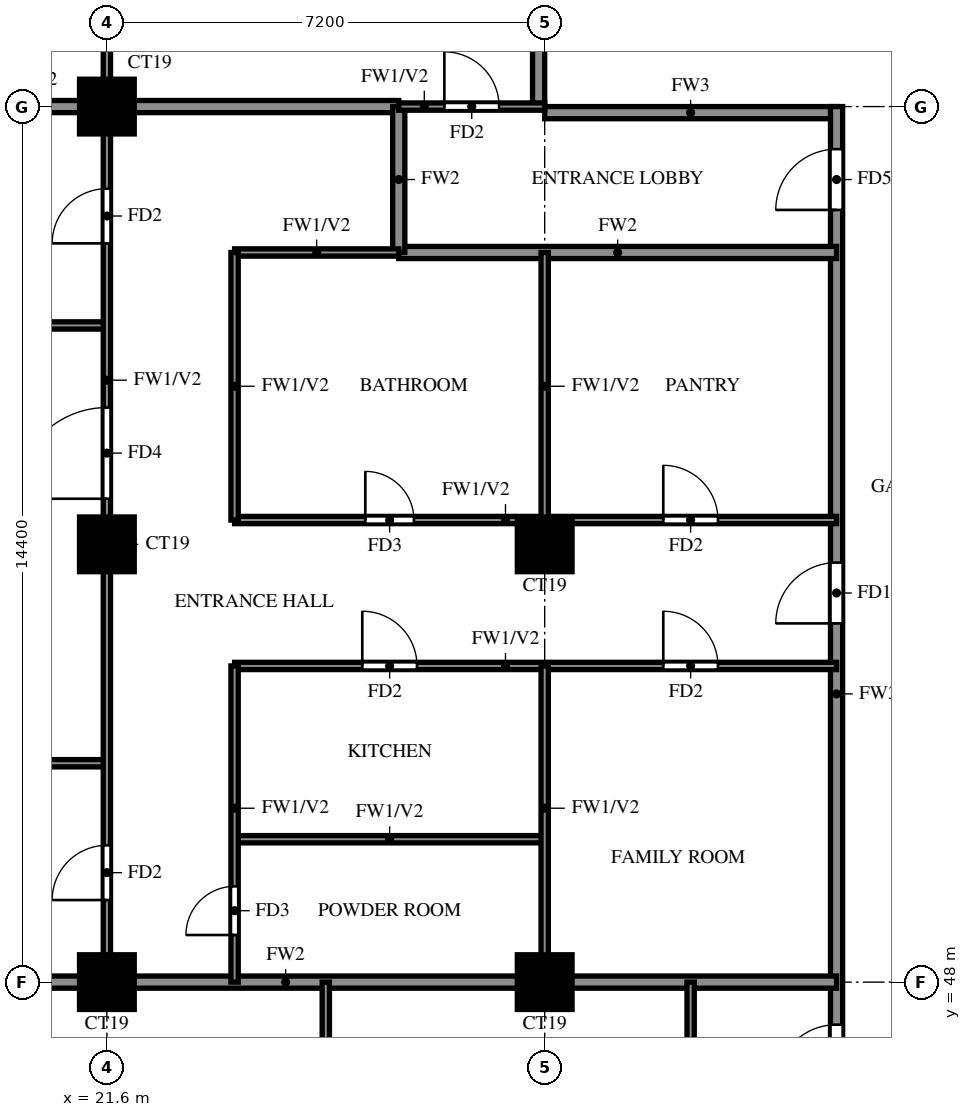
"""IFC4 building model, lengths in metres.
Left out: names, types, materials, properties, quantities, classifications, styles, units other than length and angle.
Written with IfcOpenShell. Run it as: python <this file> out.ifc"""

import sys

from ifc_helpers import new_model, si_unit, direction, frame, frame_2d, origin, origin_2d, place, context, subcontext, project, spatial, rectangle, extrude, source, transform, mapped, element, fill, save


model = new_model("IFC4")
c1 = context("Model", 3, precision=1e-05, world=origin(), true_north=direction((0.0, 1.0)))
c2 = subcontext(c1, "Body", "Model", "MODEL_VIEW")
j1 = project(units=[si_unit("LENGTHUNIT", "METRE"), si_unit("PLANEANGLEUNIT", "RADIAN")], contexts=[c1])
p1 = place(None, origin())
s1 = spatial("IfcSite", under=j1, at=p1, CompositionType="ELEMENT")
p2 = place(p1, origin())
s2 = spatial("IfcBuilding", under=s1, at=p2, CompositionType="ELEMENT")
p3 = place(p2, frame((0.0, 0.0, 199.0)))
s3 = spatial("IfcBuildingStorey", under=s2, at=p3, CompositionType="ELEMENT", Elevation=199.0)
m1 = source(origin(), c2, "Body", "SweptSolid", [
    extrude(rectangle(XDim=0.9, YDim=0.9, at=origin_2d()), origin(), (0.0, 0.0, 1.0), 3.2),
])
for number, where, z_axis, x_axis in (
    (1, (21.6, 48.0, 0.0), (0.0, 0.0, 1.0), (1.0, 0.0, 0.0)),
    (2, (28.8, 48.0, 0.0), (0.0, 0.0, 1.0), (1.0, 0.0, 0.0)),
    (3, (21.6, 55.2, 0.0), (0.0, 0.0, 1.0), (1.0, 0.0, 0.0)),
    (4, (28.8, 55.2, 0.0), (0.0, 0.0, 1.0), (1.0, 0.0, 0.0)),
    (5, (21.6, 62.4, 0.0), (0.0, 0.0, 1.0), (1.0, 0.0, 0.0)),
):
    element("IfcColumn", number, at=place(p3, frame(where, z_axis=z_axis, x_axis=x_axis)), inside=s3, PredefinedType="COLUMN", context=c2, shape_type="MappedRepresentation", body=[
        mapped(m1, transform((0.0, 0.0, 0.0))),
    ])
p4 = place(p3, frame((28.8, 62.3, 0.0), z_axis=(0.0, 0.0, 1.0), x_axis=(1.0, 0.0, 0.0)))
e6 = element("IfcWall", 6, at=p4, inside=s3, PredefinedType="SOLIDWALL", context=c2, shape_type="SweptSolid", body=[
    extrude(rectangle(XDim=4.8, YDim=0.2, at=frame_2d((2.4, 0.0))), origin(), (0.0, 0.0, 1.0), 3.2),
])
p5 = place(p3, frame((28.7, 62.4, 0.0), z_axis=(0.0, 0.0, 1.0), x_axis=(0.0, 1.0, 0.0)))
e7 = element("IfcWall", 7, at=p5, inside=s3, PredefinedType="SOLIDWALL", context=c2, shape_type="SweptSolid", body=[
    extrude(rectangle(XDim=15.6, YDim=0.2, at=frame_2d((7.8, 0.0))), origin(), (0.0, 0.0, 1.0), 3.2),
])
p6 = place(p3, frame((33.6, 45.6, 0.0), z_axis=(0.0, 0.0, 1.0), x_axis=(0.0, 1.0, 0.0)))
e8 = element("IfcWall", 8, at=p6, inside=s3, PredefinedType="SOLIDWALL", context=c2, shape_type="SweptSolid", body=[
    extrude(rectangle(XDim=16.8, YDim=0.2, at=frame_2d((8.4, 0.0))), origin(), (0.0, 0.0, 1.0), 3.2),
])
p7 = place(p6, frame((0.7, 0.0, 0.0)))
e9 = element("IfcOpeningElement", 9, at=p7, cuts=e8, PredefinedType="OPENING", context=c2, shape_type="SweptSolid", body=[
    extrude(rectangle(XDim=1.0, YDim=2.1, at=frame_2d((0.5, 1.05))), frame((0.0, 0.11, 0.0), z_axis=(0.0, -1.0, 0.0), x_axis=(1.0, 0.0, 0.0)), (0.0, 0.0, 1.0), 0.22),
])
p8 = place(p6, frame((8.3, 0.0, 0.0)))
e10 = element("IfcOpeningElement", 10, at=p8, cuts=e8, PredefinedType="OPENING", context=c2, shape_type="SweptSolid", body=[
    extrude(rectangle(XDim=1.0, YDim=2.1, at=frame_2d((0.5, 1.05))), frame((0.0, 0.11, 0.0), z_axis=(0.0, -1.0, 0.0), x_axis=(1.0, 0.0, 0.0)), (0.0, 0.0, 1.0), 0.22),
])
p9 = place(p6, frame((15.1, 0.0, 0.0)))
e11 = element("IfcOpeningElement", 11, at=p9, cuts=e8, PredefinedType="OPENING", context=c2, shape_type="SweptSolid", body=[
    extrude(rectangle(XDim=1.0, YDim=2.1, at=frame_2d((0.5, 1.05))), frame((0.0, 0.11, 0.0), z_axis=(0.0, -1.0, 0.0), x_axis=(1.0, 0.0, 0.0)), (0.0, 0.0, 1.0), 0.22),
])
p10 = place(p3, frame((14.525, 48.0, 0.0), z_axis=(0.0, 0.0, 1.0), x_axis=(1.0, 0.0, 0.0)))
e12 = element("IfcWall", 12, at=p10, inside=s3, PredefinedType="SOLIDWALL", context=c2, shape_type="SweptSolid", body=[
    extrude(rectangle(XDim=19.075, YDim=0.2, at=frame_2d((9.538, 0.0))), origin(), (0.0, 0.0, 1.0), 3.2),
])
p11 = place(p3, frame((26.4, 60.0, 0.0), z_axis=(0.0, 0.0, 1.0), x_axis=(1.0, 0.0, 0.0)))
e13 = element("IfcWall", 13, at=p11, inside=s3, PredefinedType="SOLIDWALL", context=c2, shape_type="SweptSolid", body=[
    extrude(rectangle(XDim=7.2, YDim=0.2, at=frame_2d((3.6, 0.0))), origin(), (0.0, 0.0, 1.0), 3.2),
])
p12 = place(p3, frame((14.525, 62.4, 0.0), z_axis=(0.0, 0.0, 1.0), x_axis=(1.0, 0.0, 0.0)))
e14 = element("IfcWall", 14, at=p12, inside=s3, PredefinedType="SOLIDWALL", context=c2, shape_type="SweptSolid", body=[
    extrude(rectangle(XDim=11.875, YDim=0.2, at=frame_2d((5.938, 0.0))), origin(), (0.0, 0.0, 1.0), 3.2),
])
p13 = place(p3, frame((26.4, 60.0, 0.0), z_axis=(0.0, 0.0, 1.0), x_axis=(0.0, 1.0, 0.0)))
e15 = element("IfcWall", 15, at=p13, inside=s3, PredefinedType="SOLIDWALL", context=c2, shape_type="SweptSolid", body=[
    extrude(rectangle(XDim=2.4, YDim=0.2, at=frame_2d((1.2, 0.0))), origin(), (0.0, 0.0, 1.0), 3.2),
])
p14 = place(p3, frame((23.7, 50.35, 0.0), z_axis=(0.0, 0.0, 1.0), x_axis=(1.0, 0.0, 0.0)))
e16 = element("IfcWall", 16, at=p14, inside=s3, PredefinedType="PARTITIONING", context=c2, shape_type="SweptSolid", body=[
    extrude(rectangle(XDim=5.1, YDim=0.12, at=frame_2d((2.55, 0.0))), origin(), (0.0, 0.0, 1.0), 3.2),
])
p15 = place(p3, frame((14.525, 51.6, 0.0), z_axis=(0.0, 0.0, 1.0), x_axis=(1.0, 0.0, 0.0)))
e17 = element("IfcWall", 17, at=p15, inside=s3, PredefinedType="PARTITIONING", context=c2, shape_type="SweptSolid", body=[
    extrude(rectangle(XDim=7.075, YDim=0.12, at=frame_2d((3.538, 0.0))), origin(), (0.0, 0.0, 1.0), 2.3),
])
p16 = place(p3, frame((23.7, 53.2, 0.0), z_axis=(0.0, 0.0, 1.0), x_axis=(1.0, 0.0, 0.0)))
e18 = element("IfcWall", 18, at=p16, inside=s3, PredefinedType="PARTITIONING", context=c2, shape_type="SweptSolid", body=[
    extrude(rectangle(XDim=9.9, YDim=0.12, at=frame_2d((4.95, 0.0))), origin(), (0.0, 0.0, 1.0), 3.2),
])
p17 = place(p16, frame((2.1, 0.0, 0.0)))
e19 = element("IfcOpeningElement", 19, at=p17, cuts=e18, PredefinedType="OPENING", context=c2, shape_type="SweptSolid", body=[
    extrude(rectangle(XDim=0.9, YDim=2.1, at=frame_2d((0.45, 1.05))), frame((0.0, 0.07, 0.0), z_axis=(0.0, -1.0, 0.0), x_axis=(1.0, 0.0, 0.0)), (0.0, 0.0, 1.0), 0.14),
])
p18 = place(p16, frame((7.05, 0.0, 0.0)))
e20 = element("IfcOpeningElement", 20, at=p18, cuts=e18, PredefinedType="OPENING", context=c2, shape_type="SweptSolid", body=[
    extrude(rectangle(XDim=0.9, YDim=2.1, at=frame_2d((0.45, 1.05))), frame((0.0, 0.07, 0.0), z_axis=(0.0, -1.0, 0.0), x_axis=(1.0, 0.0, 0.0)), (0.0, 0.0, 1.0), 0.14),
])
p19 = place(p3, frame((23.7, 55.6, 0.0), z_axis=(0.0, 0.0, 1.0), x_axis=(1.0, 0.0, 0.0)))
e21 = element("IfcWall", 21, at=p19, inside=s3, PredefinedType="PARTITIONING", context=c2, shape_type="SweptSolid", body=[
    extrude(rectangle(XDim=9.9, YDim=0.12, at=frame_2d((4.95, 0.0))), origin(), (0.0, 0.0, 1.0), 3.2),
])
p20 = place(p19, frame((2.15, 0.0, 0.0)))
e22 = element("IfcOpeningElement", 22, at=p20, cuts=e21, PredefinedType="OPENING", context=c2, shape_type="SweptSolid", body=[
    extrude(rectangle(XDim=0.8, YDim=2.1, at=frame_2d((0.4, 1.05))), frame((0.0, 0.07, 0.0), z_axis=(0.0, -1.0, 0.0), x_axis=(1.0, 0.0, 0.0)), (0.0, 0.0, 1.0), 0.14),
])
p21 = place(p19, frame((7.05, 0.0, 0.0)))
e23 = element("IfcOpeningElement", 23, at=p21, cuts=e21, PredefinedType="OPENING", context=c2, shape_type="SweptSolid", body=[
    extrude(rectangle(XDim=0.9, YDim=2.1, at=frame_2d((0.45, 1.05))), frame((0.0, 0.07, 0.0), z_axis=(0.0, -1.0, 0.0), x_axis=(1.0, 0.0, 0.0)), (0.0, 0.0, 1.0), 0.14),
])
p22 = place(p3, frame((14.525, 58.8, 0.0), z_axis=(0.0, 0.0, 1.0), x_axis=(1.0, 0.0, 0.0)))
e24 = element("IfcWall", 24, at=p22, inside=s3, PredefinedType="PARTITIONING", context=c2, shape_type="SweptSolid", body=[
    extrude(rectangle(XDim=7.075, YDim=0.12, at=frame_2d((3.538, 0.0))), origin(), (0.0, 0.0, 1.0), 2.3),
])
p23 = place(p3, frame((23.7, 60.0, 0.0), z_axis=(0.0, 0.0, 1.0), x_axis=(1.0, 0.0, 0.0)))
e25 = element("IfcWall", 25, at=p23, inside=s3, PredefinedType="PARTITIONING", context=c2, shape_type="SweptSolid", body=[
    extrude(rectangle(XDim=2.7, YDim=0.12, at=frame_2d((1.35, 0.0))), origin(), (0.0, 0.0, 1.0), 3.2),
])
p24 = place(p3, frame((26.4, 62.4, 0.0), z_axis=(0.0, 0.0, 1.0), x_axis=(1.0, 0.0, 0.0)))
e26 = element("IfcWall", 26, at=p24, inside=s3, PredefinedType="PARTITIONING", context=c2, shape_type="SweptSolid", body=[
    extrude(rectangle(XDim=2.4, YDim=0.12, at=frame_2d((1.2, 0.0))), origin(), (0.0, 0.0, 1.0), 3.2),
])
p25 = place(p24, frame((0.75, 0.0, 0.0)))
e27 = element("IfcOpeningElement", 27, at=p25, cuts=e26, PredefinedType="OPENING", context=c2, shape_type="SweptSolid", body=[
    extrude(rectangle(XDim=0.9, YDim=2.1, at=frame_2d((0.45, 1.05))), frame((0.0, 0.07, 0.0), z_axis=(0.0, -1.0, 0.0), x_axis=(1.0, 0.0, 0.0)), (0.0, 0.0, 1.0), 0.14),
])
p26 = place(p3, frame((21.6, 48.0, 0.0), z_axis=(0.0, 0.0, 1.0), x_axis=(0.0, 1.0, 0.0)))
e28 = element("IfcWall", 28, at=p26, inside=s3, PredefinedType="PARTITIONING", context=c2, shape_type="SweptSolid", body=[
    extrude(rectangle(XDim=18.0, YDim=0.12, at=frame_2d((9.0, 0.0))), origin(), (0.0, 0.0, 1.0), 3.2),
])
p27 = place(p26, frame((1.35, 0.0, 0.0)))
e29 = element("IfcOpeningElement", 29, at=p27, cuts=e28, PredefinedType="OPENING", context=c2, shape_type="SweptSolid", body=[
    extrude(rectangle(XDim=0.9, YDim=2.1, at=frame_2d((0.45, 1.05))), frame((0.0, 0.07, 0.0), z_axis=(0.0, -1.0, 0.0), x_axis=(1.0, 0.0, 0.0)), (0.0, 0.0, 1.0), 0.14),
])
p28 = place(p26, frame((7.95, 0.0, 0.0)))
e30 = element("IfcOpeningElement", 30, at=p28, cuts=e28, PredefinedType="OPENING", context=c2, shape_type="SweptSolid", body=[
    extrude(rectangle(XDim=1.5, YDim=2.1, at=frame_2d((0.75, 1.05))), frame((0.0, 0.07, 0.0), z_axis=(0.0, -1.0, 0.0), x_axis=(1.0, 0.0, 0.0)), (0.0, 0.0, 1.0), 0.14),
])
p29 = place(p26, frame((12.15, 0.0, 0.0)))
e31 = element("IfcOpeningElement", 31, at=p29, cuts=e28, PredefinedType="OPENING", context=c2, shape_type="SweptSolid", body=[
    extrude(rectangle(XDim=0.9, YDim=2.1, at=frame_2d((0.45, 1.05))), frame((0.0, 0.07, 0.0), z_axis=(0.0, -1.0, 0.0), x_axis=(1.0, 0.0, 0.0)), (0.0, 0.0, 1.0), 0.14),
])
p30 = place(p26, frame((15.75, 0.0, 0.0)))
e32 = element("IfcOpeningElement", 32, at=p30, cuts=e28, PredefinedType="OPENING", context=c2, shape_type="SweptSolid", body=[
    extrude(rectangle(XDim=0.9, YDim=2.1, at=frame_2d((0.45, 1.05))), frame((0.0, 0.07, 0.0), z_axis=(0.0, -1.0, 0.0), x_axis=(1.0, 0.0, 0.0)), (0.0, 0.0, 1.0), 0.14),
])
p31 = place(p3, frame((23.7, 48.0, 0.0), z_axis=(0.0, 0.0, 1.0), x_axis=(0.0, 1.0, 0.0)))
e33 = element("IfcWall", 33, at=p31, inside=s3, PredefinedType="PARTITIONING", context=c2, shape_type="SweptSolid", body=[
    extrude(rectangle(XDim=5.2, YDim=0.12, at=frame_2d((2.6, 0.0))), origin(), (0.0, 0.0, 1.0), 3.2),
])
p32 = place(p31, frame((0.775, 0.0, 0.0)))
e34 = element("IfcOpeningElement", 34, at=p32, cuts=e33, PredefinedType="OPENING", context=c2, shape_type="SweptSolid", body=[
    extrude(rectangle(XDim=0.8, YDim=2.1, at=frame_2d((0.4, 1.05))), frame((0.0, 0.07, 0.0), z_axis=(0.0, -1.0, 0.0), x_axis=(1.0, 0.0, 0.0)), (0.0, 0.0, 1.0), 0.14),
])
p33 = place(p3, frame((23.7, 55.6, 0.0), z_axis=(0.0, 0.0, 1.0), x_axis=(0.0, 1.0, 0.0)))
e35 = element("IfcWall", 35, at=p33, inside=s3, PredefinedType="PARTITIONING", context=c2, shape_type="SweptSolid", body=[
    extrude(rectangle(XDim=4.4, YDim=0.12, at=frame_2d((2.2, 0.0))), origin(), (0.0, 0.0, 1.0), 3.2),
])
p34 = place(p3, frame((25.2, 39.725, 0.0), z_axis=(0.0, 0.0, 1.0), x_axis=(0.0, 1.0, 0.0)))
e36 = element("IfcWall", 36, at=p34, inside=s3, PredefinedType="PARTITIONING", context=c2, shape_type="SweptSolid", body=[
    extrude(rectangle(XDim=8.275, YDim=0.12, at=frame_2d((4.137, 0.0))), origin(), (0.0, 0.0, 1.0), 3.2),
])
p35 = place(p34, frame((4.525, 0.0, 0.0)))
e37 = element("IfcOpeningElement", 37, at=p35, cuts=e36, PredefinedType="OPENING", context=c2, shape_type="SweptSolid", body=[
    extrude(rectangle(XDim=0.9, YDim=2.1, at=frame_2d((0.45, 1.05))), frame((0.0, 0.07, 0.0), z_axis=(0.0, -1.0, 0.0), x_axis=(1.0, 0.0, 0.0)), (0.0, 0.0, 1.0), 0.14),
])
p36 = place(p3, frame((28.8, 48.0, 0.0), z_axis=(0.0, 0.0, 1.0), x_axis=(0.0, 1.0, 0.0)))
e38 = element("IfcWall", 38, at=p36, inside=s3, PredefinedType="PARTITIONING", context=c2, shape_type="SweptSolid", body=[
    extrude(rectangle(XDim=5.2, YDim=0.12, at=frame_2d((2.6, 0.0))), origin(), (0.0, 0.0, 1.0), 3.2),
])
p37 = place(p3, frame((28.8, 55.6, 0.0), z_axis=(0.0, 0.0, 1.0), x_axis=(0.0, 1.0, 0.0)))
e39 = element("IfcWall", 39, at=p37, inside=s3, PredefinedType="PARTITIONING", context=c2, shape_type="SweptSolid", body=[
    extrude(rectangle(XDim=4.4, YDim=0.12, at=frame_2d((2.2, 0.0))), origin(), (0.0, 0.0, 1.0), 3.2),
])
p38 = place(p3, frame((31.2, 45.6, 0.0), z_axis=(0.0, 0.0, 1.0), x_axis=(0.0, 1.0, 0.0)))
e40 = element("IfcWall", 40, at=p38, inside=s3, PredefinedType="PARTITIONING", context=c2, shape_type="SweptSolid", body=[
    extrude(rectangle(XDim=2.4, YDim=0.12, at=frame_2d((1.2, 0.0))), origin(), (0.0, 0.0, 1.0), 3.2),
])
p39 = place(p7, origin())
e41 = element("IfcDoor", 41, at=p39, inside=s3, OperationType="SINGLE_SWING_LEFT", PredefinedType="DOOR", context=c2, shape_type="SweptSolid", body=[
    extrude(rectangle(XDim=1.0, YDim=2.1, at=frame_2d((0.5, 1.05))), frame((0.0, 0.025, 0.0), z_axis=(0.0, -1.0, 0.0), x_axis=(1.0, 0.0, 0.0)), (0.0, 0.0, 1.0), 0.05),
])
fill(e9, e41)
p40 = place(p8, origin())
e42 = element("IfcDoor", 42, at=p40, inside=s3, OperationType="SINGLE_SWING_LEFT", PredefinedType="DOOR", context=c2, shape_type="SweptSolid", body=[
    extrude(rectangle(XDim=1.0, YDim=2.1, at=frame_2d((0.5, 1.05))), frame((0.0, 0.025, 0.0), z_axis=(0.0, -1.0, 0.0), x_axis=(1.0, 0.0, 0.0)), (0.0, 0.0, 1.0), 0.05),
])
fill(e10, e42)
p41 = place(p27, origin())
e43 = element("IfcDoor", 43, at=p41, inside=s3, OperationType="SINGLE_SWING_RIGHT", PredefinedType="DOOR", context=c2, shape_type="SweptSolid", body=[
    extrude(rectangle(XDim=0.9, YDim=2.1, at=frame_2d((0.45, 1.05))), frame((0.0, 0.025, 0.0), z_axis=(0.0, -1.0, 0.0), x_axis=(1.0, 0.0, 0.0)), (0.0, 0.0, 1.0), 0.05),
])
fill(e29, e43)
p42 = place(p28, origin())
e44 = element("IfcDoor", 44, at=p42, inside=s3, OperationType="SINGLE_SWING_RIGHT", PredefinedType="DOOR", context=c2, shape_type="SweptSolid", body=[
    extrude(rectangle(XDim=1.5, YDim=2.1, at=frame_2d((0.75, 1.05))), frame((0.0, 0.025, 0.0), z_axis=(0.0, -1.0, 0.0), x_axis=(1.0, 0.0, 0.0)), (0.0, 0.0, 1.0), 0.05),
])
fill(e30, e44)
p43 = place(p29, origin())
e45 = element("IfcDoor", 45, at=p43, inside=s3, OperationType="SINGLE_SWING_LEFT", PredefinedType="DOOR", context=c2, shape_type="SweptSolid", body=[
    extrude(rectangle(XDim=0.9, YDim=2.1, at=frame_2d((0.45, 1.05))), frame((0.0, 0.025, 0.0), z_axis=(0.0, -1.0, 0.0), x_axis=(1.0, 0.0, 0.0)), (0.0, 0.0, 1.0), 0.05),
])
fill(e31, e45)
p44 = place(p32, origin())
e46 = element("IfcDoor", 46, at=p44, inside=s3, OperationType="SINGLE_SWING_RIGHT", PredefinedType="DOOR", context=c2, shape_type="SweptSolid", body=[
    extrude(rectangle(XDim=0.8, YDim=2.1, at=frame_2d((0.4, 1.05))), frame((0.0, 0.025, 0.0), z_axis=(0.0, -1.0, 0.0), x_axis=(1.0, 0.0, 0.0)), (0.0, 0.0, 1.0), 0.05),
])
fill(e34, e46)
p45 = place(p17, origin())
e47 = element("IfcDoor", 47, at=p45, inside=s3, OperationType="SINGLE_SWING_LEFT", PredefinedType="DOOR", context=c2, shape_type="SweptSolid", body=[
    extrude(rectangle(XDim=0.9, YDim=2.1, at=frame_2d((0.45, 1.05))), frame((0.0, 0.025, 0.0), z_axis=(0.0, -1.0, 0.0), x_axis=(1.0, 0.0, 0.0)), (0.0, 0.0, 1.0), 0.05),
])
fill(e19, e47)
p46 = place(p20, origin())
e48 = element("IfcDoor", 48, at=p46, inside=s3, OperationType="SINGLE_SWING_LEFT", PredefinedType="DOOR", context=c2, shape_type="SweptSolid", body=[
    extrude(rectangle(XDim=0.8, YDim=2.1, at=frame_2d((0.4, 1.05))), frame((0.0, 0.025, 0.0), z_axis=(0.0, -1.0, 0.0), x_axis=(1.0, 0.0, 0.0)), (0.0, 0.0, 1.0), 0.05),
])
fill(e22, e48)
p47 = place(p18, origin())
e49 = element("IfcDoor", 49, at=p47, inside=s3, OperationType="SINGLE_SWING_RIGHT", PredefinedType="DOOR", context=c2, shape_type="SweptSolid", body=[
    extrude(rectangle(XDim=0.9, YDim=2.1, at=frame_2d((0.45, 1.05))), frame((0.0, 0.025, 0.0), z_axis=(0.0, -1.0, 0.0), x_axis=(1.0, 0.0, 0.0)), (0.0, 0.0, 1.0), 0.05),
])
fill(e20, e49)
p48 = place(p21, origin())
e50 = element("IfcDoor", 50, at=p48, inside=s3, OperationType="SINGLE_SWING_LEFT", PredefinedType="DOOR", context=c2, shape_type="SweptSolid", body=[
    extrude(rectangle(XDim=0.9, YDim=2.1, at=frame_2d((0.45, 1.05))), frame((0.0, 0.025, 0.0), z_axis=(0.0, -1.0, 0.0), x_axis=(1.0, 0.0, 0.0)), (0.0, 0.0, 1.0), 0.05),
])
fill(e23, e50)
p49 = place(p25, origin())
e51 = element("IfcDoor", 51, at=p49, inside=s3, OperationType="SINGLE_SWING_LEFT", PredefinedType="DOOR", context=c2, shape_type="SweptSolid", body=[
    extrude(rectangle(XDim=0.9, YDim=2.1, at=frame_2d((0.45, 1.05))), frame((0.0, 0.025, 0.0), z_axis=(0.0, -1.0, 0.0), x_axis=(1.0, 0.0, 0.0)), (0.0, 0.0, 1.0), 0.05),
])
fill(e27, e51)
p50 = place(p9, origin())
e52 = element("IfcDoor", 52, at=p50, inside=s3, OperationType="SINGLE_SWING_LEFT", PredefinedType="DOOR", context=c2, shape_type="SweptSolid", body=[
    extrude(rectangle(XDim=1.0, YDim=2.1, at=frame_2d((0.5, 1.05))), frame((0.0, 0.025, 0.0), z_axis=(0.0, -1.0, 0.0), x_axis=(1.0, 0.0, 0.0)), (0.0, 0.0, 1.0), 0.05),
])
fill(e11, e52)
save(model, sys.argv[1])
